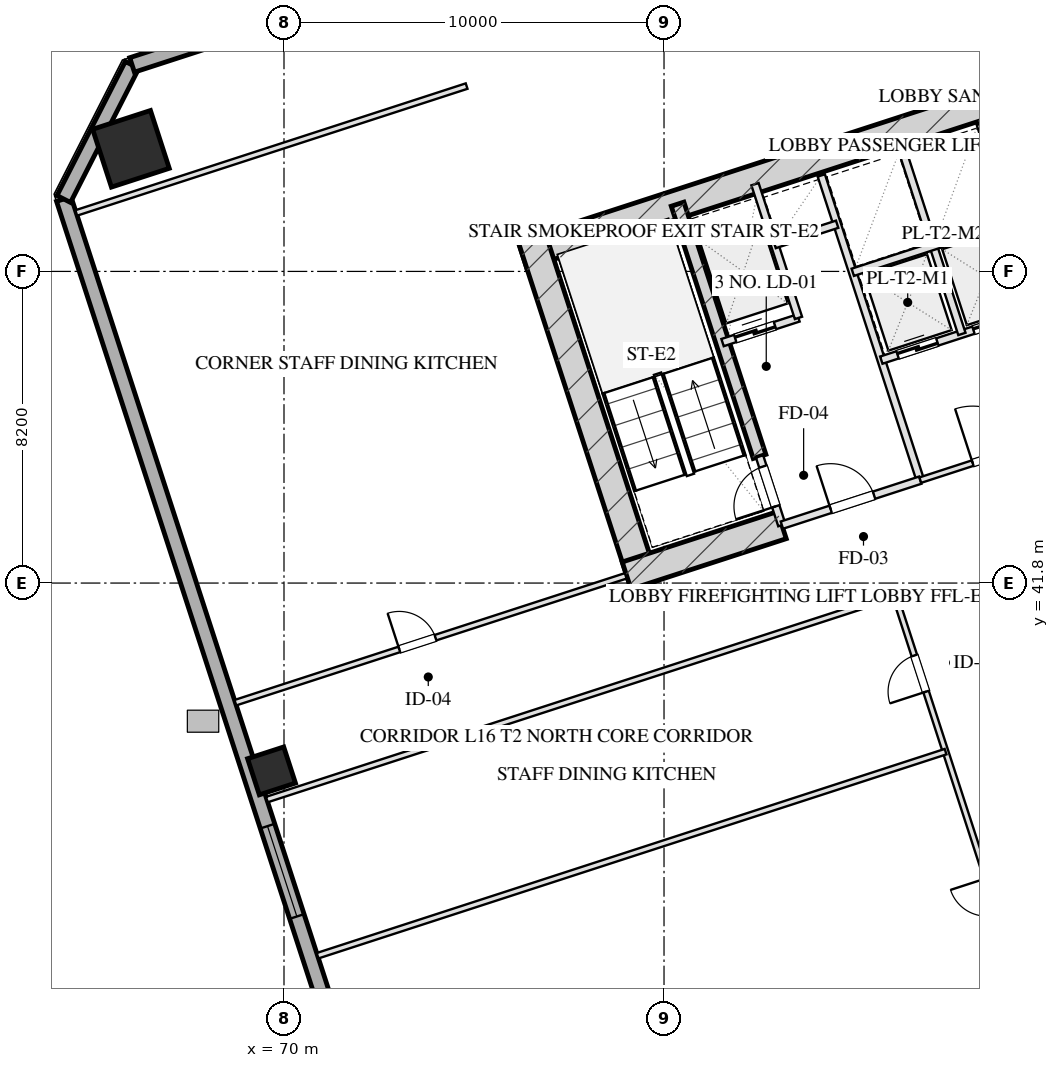
"""IFC4 building model, lengths in metres.
Left out: names, types, materials, properties, quantities, classifications, styles, units other than length and angle.
Written with IfcOpenShell. Run it as: python <this file> out.ifc"""

import sys

from ifc_helpers import new_model, si_unit, direction, frame, frame_2d, origin, origin_2d, place, context, subcontext, project, spatial, rectangle, hollow_rectangle, extrude, element, fill, save


model = new_model("IFC4")
c1 = context("Model", 3, precision=1e-05, world=origin(), true_north=direction((0.0, 1.0)))
c2 = subcontext(c1, "Body", "Model", "MODEL_VIEW")
j1 = project(units=[si_unit("LENGTHUNIT", "METRE"), si_unit("PLANEANGLEUNIT", "RADIAN")], contexts=[c1])
p1 = place(None, origin())
s1 = spatial("IfcSite", under=j1, at=p1, CompositionType="ELEMENT")
p2 = place(p1, origin())
s2 = spatial("IfcBuilding", under=s1, at=p2, CompositionType="ELEMENT")
p3 = place(p2, frame((0.0, 0.0, 67.85)))
s3 = spatial("IfcBuildingStorey", under=s2, at=p3, CompositionType="ELEMENT", Elevation=67.85)
p4 = place(p3, frame((76.272, 50.443, 0.0), z_axis=(0.0, 0.0, 1.0), x_axis=(0.951056072937, 0.309018358888, 0.0)))
e1 = element("IfcWall", 1, at=p4, inside=s3, PredefinedType="SHEAR", context=c2, shape_type="SweptSolid", body=[
    extrude(rectangle(XDim=16.55, YDim=0.75, at=frame_2d((8.275, 0.0))), origin(), (0.0, 0.0, 1.0), 3.45),
])
p5 = place(p3, frame((79.489, 41.756, 0.0), z_axis=(0.0, 0.0, 1.0), x_axis=(-0.309016134813, 0.951056795583, 0.0)))
e2 = element("IfcWall", 2, at=p5, inside=s3, PredefinedType="SHEAR", context=c2, shape_type="SweptSolid", body=[
    extrude(rectangle(XDim=9.63, YDim=0.75, at=frame_2d((4.815, 0.0))), origin(), (0.0, 0.0, 1.0), 3.45),
])
p6 = place(p3, frame((82.514, 45.131, 0.0), z_axis=(0.0, 0.0, 1.0), x_axis=(-0.308988790936, 0.951065679686, 0.0)))
e3 = element("IfcWall", 3, at=p6, inside=s3, PredefinedType="SHEAR", context=c2, shape_type="SweptSolid", body=[
    extrude(rectangle(XDim=6.98, YDim=0.35, at=frame_2d((3.49, 0.0))), origin(), (0.0, 0.0, 1.0), 3.45),
])
p7 = place(p3, frame((79.016, 41.997, 0.0), z_axis=(0.0, 0.0, 1.0), x_axis=(0.95106038264, 0.309005094736, 0.0)))
e4 = element("IfcWall", 4, at=p7, inside=s3, PredefinedType="SHEAR", context=c2, shape_type="SweptSolid", body=[
    extrude(rectangle(XDim=4.295, YDim=0.75, at=frame_2d((2.147, 0.0))), origin(), (0.0, 0.0, 1.0), 3.45),
])
p8 = place(p3, frame((65.973, 53.226, 0.0), z_axis=(0.0, 0.0, 1.0), x_axis=(0.951056516295, 0.309016994375, 0.0)))
e5 = element("IfcColumn", 5, at=p8, inside=s3, PredefinedType="COLUMN", context=c2, shape_type="SweptSolid", body=[
    extrude(hollow_rectangle(XDim=1.6, YDim=1.6, WallThickness=0.055, at=origin_2d()), origin(), (0.0, 0.0, 1.0), 3.451),
])
p9 = place(p3, frame((69.672, 36.858, 0.0), z_axis=(0.0, 0.0, 1.0), x_axis=(0.951056516295, 0.309016994375, 0.0)))
e6 = element("IfcColumn", 6, at=p9, inside=s3, PredefinedType="COLUMN", context=c2, shape_type="SweptSolid", body=[
    extrude(hollow_rectangle(XDim=1.0, YDim=1.0, WallThickness=0.036, at=origin_2d()), origin(), (0.0, 0.0, 1.0), 3.451),
])
p10 = place(p3, frame((79.655, 4.352, 0.0), z_axis=(0.0, 0.0, 1.0), x_axis=(-0.309014526607, 0.951057318118, 0.0)))
e7 = element("IfcWall", 7, at=p10, inside=s3, PredefinedType="SOLIDWALL", context=c2, shape_type="SweptSolid", body=[
    extrude(rectangle(XDim=50.0, YDim=0.4, at=frame_2d((25.0, 0.0))), origin(), (0.0, 0.0, 1.0), 2.61),
])
p11 = place(p10, frame((30.15, 0.0, 0.75)))
e8 = element("IfcOpeningElement", 8, at=p11, cuts=e7, PredefinedType="OPENING", context=c2, shape_type="SweptSolid", body=[
    extrude(rectangle(XDim=2.5, YDim=1.46, at=frame_2d((1.25, 0.73))), frame((0.0, 0.21, 0.0), z_axis=(0.0, -1.0, 0.0), x_axis=(1.0, 0.0, 0.0)), (0.0, 0.0, 1.0), 0.42),
])
p12 = place(p10, frame((18.65, 0.0, 0.0)))
e9 = element("IfcOpeningElement", 9, at=p12, cuts=e7, PredefinedType="OPENING", context=c2, shape_type="SweptSolid", body=[
    extrude(rectangle(XDim=1.1, YDim=2.15, at=frame_2d((0.55, 1.075))), frame((0.0, 0.21, 0.0), z_axis=(0.0, -1.0, 0.0), x_axis=(1.0, 0.0, 0.0)), (0.0, 0.0, 1.0), 0.42),
])
p13 = place(p3, frame((64.205, 51.905, 0.0), z_axis=(0.0, 0.0, 1.0), x_axis=(0.453958106755, 0.891023028497, 0.0)))
e10 = element("IfcWall", 10, at=p13, inside=s3, PredefinedType="SOLIDWALL", context=c2, shape_type="SweptSolid", body=[
    extrude(rectangle(XDim=3.96, YDim=0.4, at=frame_2d((1.98, 0.0))), origin(), (0.0, 0.0, 1.0), 2.61),
])
p14 = place(p3, frame((66.002, 55.433, 0.0), z_axis=(0.0, 0.0, 1.0), x_axis=(0.951055939317, 0.309018770125, 0.0)))
e11 = element("IfcWall", 11, at=p14, inside=s3, PredefinedType="SOLIDWALL", context=c2, shape_type="SweptSolid", body=[
    extrude(rectangle(XDim=32.4, YDim=0.4, at=frame_2d((16.2, 0.0))), origin(), (0.0, 0.0, 1.0), 2.61),
])
p15 = place(p3, frame((83.101, 43.324, 0.0), z_axis=(0.0, 0.0, 1.0), x_axis=(-0.309048298632, 0.951046344356, 0.0)))
e12 = element("IfcWall", 12, at=p15, inside=s3, PredefinedType="PARTITIONING", context=c2, shape_type="SweptSolid", body=[
    extrude(rectangle(XDim=1.9, YDim=0.2, at=frame_2d((0.95, 0.0))), origin(), (0.0, 0.0, 1.0), 3.175),
])
p16 = place(p15, frame((0.52, 0.0, 0.0)))
e13 = element("IfcOpeningElement", 13, at=p16, cuts=e12, PredefinedType="OPENING", context=c2, shape_type="SweptSolid", body=[
    extrude(rectangle(XDim=1.1, YDim=2.05, at=frame_2d((0.55, 1.025))), frame((0.0, 0.11, 0.0), z_axis=(0.0, -1.0, 0.0), x_axis=(1.0, 0.0, 0.0)), (0.0, 0.0, 1.0), 0.22),
])
p17 = place(p3, frame((86.743, 44.508, 0.0), z_axis=(0.0, 0.0, 1.0), x_axis=(-0.309016001439, 0.951056838919, 0.0)))
e14 = element("IfcWall", 14, at=p17, inside=s3, PredefinedType="PARTITIONING", context=c2, shape_type="SweptSolid", body=[
    extrude(rectangle(XDim=8.43, YDim=0.2, at=frame_2d((4.215, 0.0))), origin(), (0.0, 0.0, 1.0), 3.175),
])
p18 = place(p3, frame((83.101, 43.324, 0.0), z_axis=(0.0, 0.0, 1.0), x_axis=(0.951052804469, 0.309028417967, 0.0)))
e15 = element("IfcWall", 15, at=p18, inside=s3, PredefinedType="PARTITIONING", context=c2, shape_type="SweptSolid", body=[
    extrude(rectangle(XDim=3.83, YDim=0.2, at=frame_2d((1.915, 0.0))), origin(), (0.0, 0.0, 1.0), 3.175),
])
p19 = place(p18, frame((1.35, 0.0, 0.0)))
e16 = element("IfcOpeningElement", 16, at=p19, cuts=e15, PredefinedType="OPENING", context=c2, shape_type="SweptSolid", body=[
    extrude(rectangle(XDim=1.2, YDim=2.05, at=frame_2d((0.6, 1.025))), frame((0.0, 0.11, 0.0), z_axis=(0.0, -1.0, 0.0), x_axis=(1.0, 0.0, 0.0)), (0.0, 0.0, 1.0), 0.22),
])
p20 = place(p3, frame((81.54, 48.127, 0.0), z_axis=(0.0, 0.0, 1.0), x_axis=(0.951062257173, 0.308999325213, 0.0)))
e17 = element("IfcWall", 17, at=p20, inside=s3, PredefinedType="PARTITIONING", context=c2, shape_type="SweptSolid", body=[
    extrude(rectangle(XDim=2.1, YDim=0.2, at=frame_2d((1.05, 0.0))), origin(), (0.0, 0.0, 1.0), 3.175),
])
p21 = place(p20, frame((0.35, 0.0, 0.0)))
e18 = element("IfcOpeningElement", 18, at=p21, cuts=e17, PredefinedType="OPENING", context=c2, shape_type="SweptSolid", body=[
    extrude(rectangle(XDim=1.1, YDim=2.05, at=frame_2d((0.55, 1.025))), frame((0.0, 0.11, 0.0), z_axis=(0.0, -1.0, 0.0), x_axis=(1.0, 0.0, 0.0)), (0.0, 0.0, 1.0), 0.22),
])
p22 = place(p3, frame((83.538, 48.776, 0.0), z_axis=(0.0, 0.0, 1.0), x_axis=(-0.3089935693, 0.951064127245, 0.0)))
e19 = element("IfcWall", 19, at=p22, inside=s3, PredefinedType="PARTITIONING", context=c2, shape_type="SweptSolid", body=[
    extrude(rectangle(XDim=3.7, YDim=0.2, at=frame_2d((1.85, 0.0))), origin(), (0.0, 0.0, 1.0), 3.175),
])
p23 = place(p3, frame((82.91, 50.707, 0.0), z_axis=(0.0, 0.0, 1.0), x_axis=(0.951041328149, 0.309063734775, 0.0)))
e20 = element("IfcWall", 20, at=p23, inside=s3, PredefinedType="PARTITIONING", context=c2, shape_type="SweptSolid", body=[
    extrude(rectangle(XDim=1.73, YDim=0.2, at=frame_2d((0.865, 0.0))), origin(), (0.0, 0.0, 1.0), 3.175),
])
p24 = place(p3, frame((90.928, 45.868, 0.0), z_axis=(0.0, 0.0, 1.0), x_axis=(-0.309042196757, 0.951048327176, 0.0)))
e21 = element("IfcWall", 21, at=p24, inside=s3, PredefinedType="PARTITIONING", context=c2, shape_type="SweptSolid", body=[
    extrude(rectangle(XDim=8.43, YDim=0.2, at=frame_2d((4.215, 0.0))), origin(), (0.0, 0.0, 1.0), 3.175),
])
p25 = place(p3, frame((86.743, 44.508, 0.0), z_axis=(0.0, 0.0, 1.0), x_axis=(0.951063829732, 0.308994485023, 0.0)))
e22 = element("IfcWall", 22, at=p25, inside=s3, PredefinedType="PARTITIONING", context=c2, shape_type="SweptSolid", body=[
    extrude(rectangle(XDim=4.4, YDim=0.15, at=frame_2d((2.2, 0.0))), origin(), (0.0, 0.0, 1.0), 3.175),
])
p26 = place(p25, frame((1.45, 0.0, 0.0)))
e23 = element("IfcOpeningElement", 23, at=p26, cuts=e22, PredefinedType="OPENING", context=c2, shape_type="SweptSolid", body=[
    extrude(rectangle(XDim=1.5, YDim=2.05, at=frame_2d((0.75, 1.025))), frame((0.0, 0.085, 0.0), z_axis=(0.0, -1.0, 0.0), x_axis=(1.0, 0.0, 0.0)), (0.0, 0.0, 1.0), 0.17),
])
p27 = place(p3, frame((85.718, 47.666, 0.0), z_axis=(0.0, 0.0, 1.0), x_axis=(0.951058531764, 0.30901079133, 0.0)))
e24 = element("IfcWall", 24, at=p27, inside=s3, PredefinedType="PARTITIONING", context=c2, shape_type="SweptSolid", body=[
    extrude(rectangle(XDim=4.4, YDim=0.2, at=frame_2d((2.2, 0.0))), origin(), (0.0, 0.0, 1.0), 3.175),
])
p28 = place(p27, frame((0.45, 0.0, 0.0)))
e25 = element("IfcOpeningElement", 25, at=p28, cuts=e24, PredefinedType="OPENING", context=c2, shape_type="SweptSolid", body=[
    extrude(rectangle(XDim=1.1, YDim=2.05, at=frame_2d((0.55, 1.025))), frame((0.0, 0.11, 0.0), z_axis=(0.0, -1.0, 0.0), x_axis=(1.0, 0.0, 0.0)), (0.0, 0.0, 1.0), 0.22),
])
p29 = place(p27, frame((2.55, 0.0, 0.0)))
e26 = element("IfcOpeningElement", 26, at=p29, cuts=e24, PredefinedType="OPENING", context=c2, shape_type="SweptSolid", body=[
    extrude(rectangle(XDim=1.1, YDim=2.05, at=frame_2d((0.55, 1.025))), frame((0.0, 0.11, 0.0), z_axis=(0.0, -1.0, 0.0), x_axis=(1.0, 0.0, 0.0)), (0.0, 0.0, 1.0), 0.22),
])
p30 = place(p3, frame((87.838, 48.354, 0.0), z_axis=(0.0, 0.0, 1.0), x_axis=(-0.3090093719, 0.951058992953, 0.0)))
e27 = element("IfcWall", 27, at=p30, inside=s3, PredefinedType="PARTITIONING", context=c2, shape_type="SweptSolid", body=[
    extrude(rectangle(XDim=5.11, YDim=0.2, at=frame_2d((2.555, 0.0))), origin(), (0.0, 0.0, 1.0), 3.175),
])
p31 = place(p3, frame((84.967, 49.977, 0.0), z_axis=(0.0, 0.0, 1.0), x_axis=(0.951063829732, 0.308994485023, 0.0)))
e28 = element("IfcWall", 28, at=p31, inside=s3, PredefinedType="PARTITIONING", context=c2, shape_type="SweptSolid", body=[
    extrude(rectangle(XDim=4.4, YDim=0.2, at=frame_2d((2.2, 0.0))), origin(), (0.0, 0.0, 1.0), 3.175),
])
p32 = place(p3, frame((64.534, 51.539, 0.0), z_axis=(0.0, 0.0, 1.0), x_axis=(0.951056658866, 0.309016555588, 0.0)))
e29 = element("IfcWall", 29, at=p32, inside=s3, PredefinedType="PARTITIONING", context=c2, shape_type="SweptSolid", body=[
    extrude(rectangle(XDim=10.8, YDim=0.15, at=frame_2d((5.4, 0.0))), origin(), (0.0, 0.0, 1.0), 3.175),
])
p33 = place(p3, frame((68.721, 38.652, 0.0), z_axis=(0.0, 0.0, 1.0), x_axis=(0.951056658866, 0.309016555588, 0.0)))
e30 = element("IfcWall", 30, at=p33, inside=s3, PredefinedType="PARTITIONING", context=c2, shape_type="SweptSolid", body=[
    extrude(rectangle(XDim=10.8, YDim=0.15, at=frame_2d((5.4, 0.0))), origin(), (0.0, 0.0, 1.0), 3.175),
])
p34 = place(p33, frame((4.536, 0.0, 0.0)))
e31 = element("IfcOpeningElement", 31, at=p34, cuts=e30, PredefinedType="OPENING", context=c2, shape_type="SweptSolid", body=[
    extrude(rectangle(XDim=1.0, YDim=2.05, at=frame_2d((0.5, 1.025))), frame((0.0, 0.085, 0.0), z_axis=(0.0, -1.0, 0.0), x_axis=(1.0, 0.0, 0.0)), (0.0, 0.0, 1.0), 0.17),
])
p35 = place(p3, frame((69.549, 36.103, 0.0), z_axis=(0.0, 0.0, 1.0), x_axis=(0.951057299418, 0.309014584159, 0.0)))
e32 = element("IfcWall", 32, at=p35, inside=s3, PredefinedType="PARTITIONING", context=c2, shape_type="SweptSolid", body=[
    extrude(rectangle(XDim=17.375, YDim=0.15, at=frame_2d((8.688, 0.0))), origin(), (0.0, 0.0, 1.0), 3.175),
])
p36 = place(p3, frame((91.216, 25.647, 0.0), z_axis=(0.0, 0.0, 1.0), x_axis=(-0.309022042254, 0.951054876125, 0.0)))
e33 = element("IfcWall", 33, at=p36, inside=s3, PredefinedType="PARTITIONING", context=c2, shape_type="SweptSolid", body=[
    extrude(rectangle(XDim=16.64, YDim=0.15, at=frame_2d((8.32, 0.0))), origin(), (0.0, 0.0, 1.0), 3.175),
])
p37 = place(p36, frame((1.66, 0.0, 0.0)))
e34 = element("IfcOpeningElement", 34, at=p37, cuts=e33, PredefinedType="OPENING", context=c2, shape_type="SweptSolid", body=[
    extrude(rectangle(XDim=1.0, YDim=2.05, at=frame_2d((0.5, 1.025))), frame((0.0, 0.085, 0.0), z_axis=(0.0, -1.0, 0.0), x_axis=(1.0, 0.0, 0.0)), (0.0, 0.0, 1.0), 0.17),
])
p38 = place(p36, frame((7.82, 0.0, 0.0)))
e35 = element("IfcOpeningElement", 35, at=p38, cuts=e33, PredefinedType="OPENING", context=c2, shape_type="SweptSolid", body=[
    extrude(rectangle(XDim=1.0, YDim=2.05, at=frame_2d((0.5, 1.025))), frame((0.0, 0.085, 0.0), z_axis=(0.0, -1.0, 0.0), x_axis=(1.0, 0.0, 0.0)), (0.0, 0.0, 1.0), 0.17),
])
p39 = place(p36, frame((13.98, 0.0, 0.0)))
e36 = element("IfcOpeningElement", 36, at=p39, cuts=e33, PredefinedType="OPENING", context=c2, shape_type="SweptSolid", body=[
    extrude(rectangle(XDim=1.0, YDim=2.05, at=frame_2d((0.5, 1.025))), frame((0.0, 0.085, 0.0), z_axis=(0.0, -1.0, 0.0), x_axis=(1.0, 0.0, 0.0)), (0.0, 0.0, 1.0), 0.17),
])
p40 = place(p3, frame((70.884, 31.995, 0.0), z_axis=(0.0, 0.0, 1.0), x_axis=(0.951057299418, 0.309014584159, 0.0)))
e37 = element("IfcWall", 37, at=p40, inside=s3, PredefinedType="PARTITIONING", context=c2, shape_type="SweptSolid", body=[
    extrude(rectangle(XDim=17.375, YDim=0.15, at=frame_2d((8.688, 0.0))), origin(), (0.0, 0.0, 1.0), 3.175),
])
p41 = place(p11, origin())
e38 = element("IfcWindow", 38, at=p41, inside=s3, PartitioningType="TRIPLE_PANEL_VERTICAL", PredefinedType="WINDOW", context=c2, shape_type="SweptSolid", body=[
    extrude(rectangle(XDim=2.5, YDim=1.46, at=frame_2d((1.25, 0.73))), frame((0.0, 0.03, 0.0), z_axis=(0.0, -1.0, 0.0), x_axis=(1.0, 0.0, 0.0)), (0.0, 0.0, 1.0), 0.06),
])
fill(e8, e38)
p42 = place(p16, origin())
e39 = element("IfcDoor", 39, at=p42, inside=s3, OperationType="SINGLE_SWING_LEFT", PredefinedType="DOOR", context=c2, shape_type="SweptSolid", body=[
    extrude(rectangle(XDim=1.1, YDim=2.05, at=frame_2d((0.55, 1.025))), frame((0.0, 0.025, 0.0), z_axis=(0.0, -1.0, 0.0), x_axis=(1.0, 0.0, 0.0)), (0.0, 0.0, 1.0), 0.05),
])
fill(e13, e39)
p43 = place(p19, origin())
e40 = element("IfcDoor", 40, at=p43, inside=s3, OperationType="SINGLE_SWING_LEFT", PredefinedType="DOOR", context=c2, shape_type="SweptSolid", body=[
    extrude(rectangle(XDim=1.2, YDim=2.05, at=frame_2d((0.6, 1.025))), frame((0.0, 0.025, 0.0), z_axis=(0.0, -1.0, 0.0), x_axis=(1.0, 0.0, 0.0)), (0.0, 0.0, 1.0), 0.05),
])
fill(e16, e40)
p44 = place(p21, origin())
e41 = element("IfcDoor", 41, at=p44, inside=s3, OperationType="DOUBLE_DOOR_SLIDING", PredefinedType="DOOR", context=c2, shape_type="SweptSolid", body=[
    extrude(rectangle(XDim=1.1, YDim=2.05, at=frame_2d((0.55, 1.025))), frame((0.0, 0.025, 0.0), z_axis=(0.0, -1.0, 0.0), x_axis=(1.0, 0.0, 0.0)), (0.0, 0.0, 1.0), 0.05),
])
fill(e18, e41)
p45 = place(p26, origin())
e42 = element("IfcDoor", 42, at=p45, inside=s3, OperationType="SINGLE_SWING_LEFT", PredefinedType="DOOR", context=c2, shape_type="SweptSolid", body=[
    extrude(rectangle(XDim=1.5, YDim=2.05, at=frame_2d((0.75, 1.025))), frame((0.0, 0.025, 0.0), z_axis=(0.0, -1.0, 0.0), x_axis=(1.0, 0.0, 0.0)), (0.0, 0.0, 1.0), 0.05),
])
fill(e23, e42)
p46 = place(p28, origin())
e43 = element("IfcDoor", 43, at=p46, inside=s3, OperationType="DOUBLE_DOOR_SLIDING", PredefinedType="DOOR", context=c2, shape_type="SweptSolid", body=[
    extrude(rectangle(XDim=1.1, YDim=2.05, at=frame_2d((0.55, 1.025))), frame((0.0, 0.025, 0.0), z_axis=(0.0, -1.0, 0.0), x_axis=(1.0, 0.0, 0.0)), (0.0, 0.0, 1.0), 0.05),
])
fill(e25, e43)
p47 = place(p29, origin())
e44 = element("IfcDoor", 44, at=p47, inside=s3, OperationType="DOUBLE_DOOR_SLIDING", PredefinedType="DOOR", context=c2, shape_type="SweptSolid", body=[
    extrude(rectangle(XDim=1.1, YDim=2.05, at=frame_2d((0.55, 1.025))), frame((0.0, 0.025, 0.0), z_axis=(0.0, -1.0, 0.0), x_axis=(1.0, 0.0, 0.0)), (0.0, 0.0, 1.0), 0.05),
])
fill(e26, e44)
p48 = place(p34, origin())
e45 = element("IfcDoor", 45, at=p48, inside=s3, OperationType="SINGLE_SWING_LEFT", PredefinedType="DOOR", context=c2, shape_type="SweptSolid", body=[
    extrude(rectangle(XDim=1.0, YDim=2.05, at=frame_2d((0.5, 1.025))), frame((0.0, 0.025, 0.0), z_axis=(0.0, -1.0, 0.0), x_axis=(1.0, 0.0, 0.0)), (0.0, 0.0, 1.0), 0.05),
])
fill(e31, e45)
p49 = place(p39, origin())
e46 = element("IfcDoor", 46, at=p49, inside=s3, OperationType="SINGLE_SWING_LEFT", PredefinedType="DOOR", context=c2, shape_type="SweptSolid", body=[
    extrude(rectangle(XDim=1.0, YDim=2.05, at=frame_2d((0.5, 1.025))), frame((0.0, 0.025, 0.0), z_axis=(0.0, -1.0, 0.0), x_axis=(1.0, 0.0, 0.0)), (0.0, 0.0, 1.0), 0.05),
])
fill(e36, e46)
save(model, sys.argv[1])
